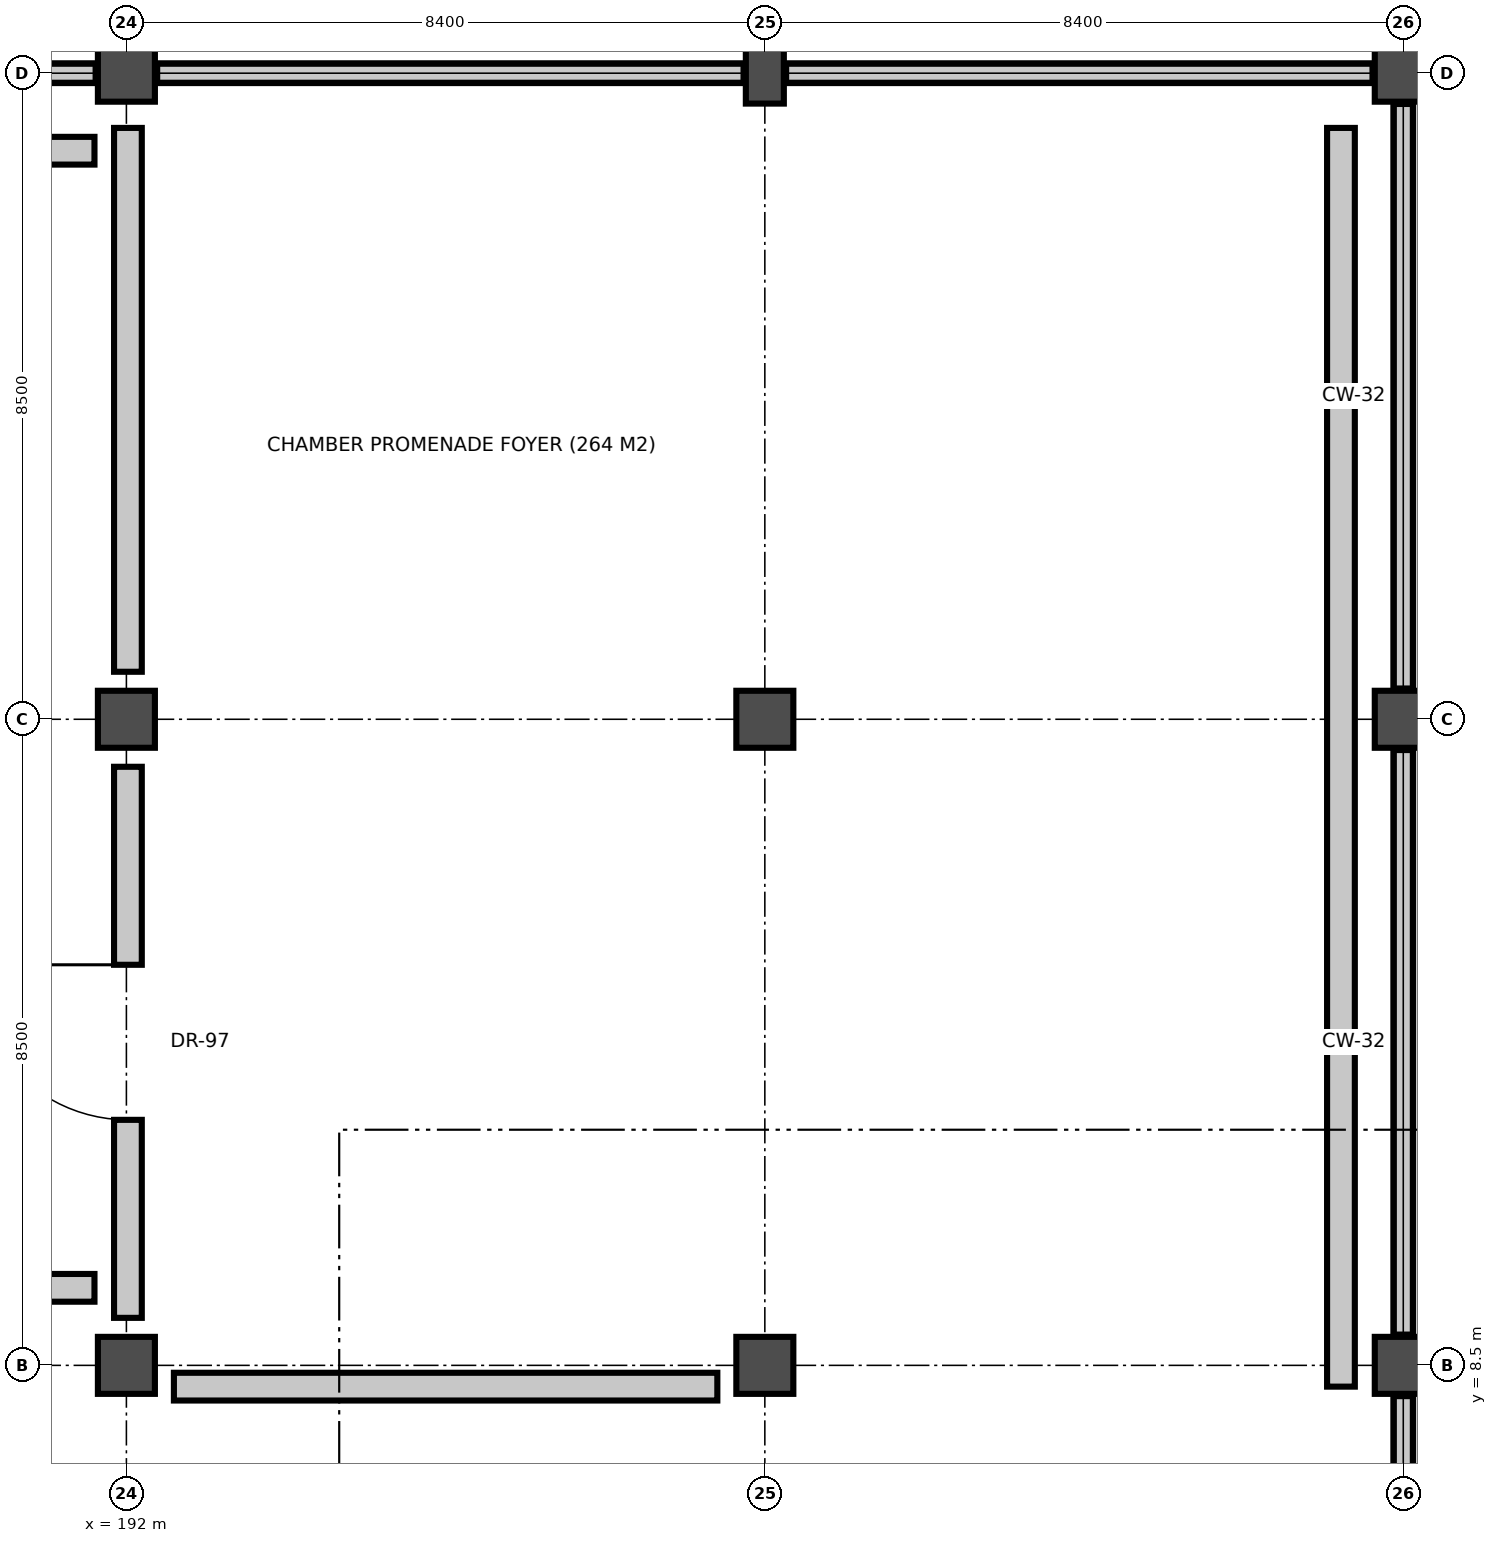
"""IFC4 building model, lengths in metres.
Left out: names, types, materials, properties, quantities, classifications, styles, units other than length and angle.
Written with IfcOpenShell. Run it as: python <this file> out.ifc"""

import sys

from ifc_helpers import new_model, si_unit, direction, frame, frame_2d, origin, origin_2d, place, context, subcontext, project, spatial, rectangle, extrude, element, fill, save


model = new_model("IFC4")
c1 = context("Model", 3, precision=1e-05, world=origin(), true_north=direction((0.0, 1.0)))
c2 = subcontext(c1, "Body", "Model", "MODEL_VIEW")
j1 = project(units=[si_unit("LENGTHUNIT", "METRE"), si_unit("PLANEANGLEUNIT", "RADIAN")], contexts=[c1])
p1 = place(None, origin())
s1 = spatial("IfcSite", under=j1, at=p1, CompositionType="ELEMENT")
p2 = place(p1, origin())
s2 = spatial("IfcBuilding", under=s1, at=p2, CompositionType="ELEMENT")
p3 = place(p2, frame((0.0, 0.0, 5.4)))
s3 = spatial("IfcBuildingStorey", under=s2, at=p3, CompositionType="ELEMENT", Elevation=5.4)
for number, where, z_axis, x_axis in (
    (1, (192.0, 8.5, 0.0), (0.0, 0.0, 1.0), (1.0, 0.0, 0.0)),
    (2, (192.0, 17.0, 0.0), (0.0, 0.0, 1.0), (1.0, 0.0, 0.0)),
    (3, (192.0, 25.5, 0.0), (0.0, 0.0, 1.0), (1.0, 0.0, 0.0)),
    (4, (200.4, 8.5, 0.0), (0.0, 0.0, 1.0), (1.0, 0.0, 0.0)),
    (5, (200.4, 17.0, 0.0), (0.0, 0.0, 1.0), (1.0, 0.0, 0.0)),
):
    element("IfcColumn", number, at=place(p3, frame(where, z_axis=z_axis, x_axis=x_axis)), inside=s3, PredefinedType="COLUMN", context=c2, shape_type="SweptSolid", body=[
        extrude(rectangle(XDim=0.75, YDim=0.75, at=origin_2d()), origin(), (0.0, 0.0, 1.0), 4.8),
    ])
p4 = place(p3, frame((200.4, 25.5, 0.0), z_axis=(0.0, 0.0, 1.0), x_axis=(1.0, 0.0, 0.0)))
e6 = element("IfcColumn", 6, at=p4, inside=s3, PredefinedType="PILASTER", context=c2, shape_type="SweptSolid", body=[
    extrude(rectangle(XDim=0.5, YDim=0.8, at=origin_2d()), origin(), (0.0, 0.0, 1.0), 4.8),
])
for number, where, z_axis, x_axis in (
    (7, (208.8, 8.5, 0.0), (0.0, 0.0, 1.0), (1.0, 0.0, 0.0)),
    (8, (208.8, 17.0, 0.0), (0.0, 0.0, 1.0), (1.0, 0.0, 0.0)),
    (9, (208.8, 25.5, 0.0), (0.0, 0.0, 1.0), (1.0, 0.0, 0.0)),
):
    element("IfcColumn", number, at=place(p3, frame(where, z_axis=z_axis, x_axis=x_axis)), inside=s3, PredefinedType="COLUMN", context=c2, shape_type="SweptSolid", body=[
        extrude(rectangle(XDim=0.75, YDim=0.75, at=origin_2d()), origin(), (0.0, 0.0, 1.0), 4.8),
    ])
p5 = place(p3, frame((183.995, 25.5, 0.0), z_axis=(0.0, 0.0, 1.0), x_axis=(1.0, 0.0, 0.0)))
e10 = element("IfcWall", 10, at=p5, inside=s3, PredefinedType="PARAPET", context=c2, shape_type="SweptSolid", body=[
    extrude(rectangle(XDim=7.61, YDim=0.26, at=frame_2d((3.805, 0.0))), origin(), (0.0, 0.0, 1.0), 1.12),
])
p6 = place(p3, frame((192.395, 25.5, 0.0), z_axis=(0.0, 0.0, 1.0), x_axis=(1.0, 0.0, 0.0)))
e11 = element("IfcWall", 11, at=p6, inside=s3, PredefinedType="PARAPET", context=c2, shape_type="SweptSolid", body=[
    extrude(rectangle(XDim=7.735, YDim=0.26, at=frame_2d((3.867, 0.0))), origin(), (0.0, 0.0, 1.0), 1.12),
])
p7 = place(p3, frame((200.67, 25.5, 0.0), z_axis=(0.0, 0.0, 1.0), x_axis=(1.0, 0.0, 0.0)))
e12 = element("IfcWall", 12, at=p7, inside=s3, PredefinedType="PARAPET", context=c2, shape_type="SweptSolid", body=[
    extrude(rectangle(XDim=7.735, YDim=0.26, at=frame_2d((3.868, 0.0))), origin(), (0.0, 0.0, 1.0), 1.12),
])
for number, where, z_axis, x_axis in (
    (13, (208.8, 8.105, 0.0), (0.0, 0.0, 1.0), (0.0, -1.0, 0.0)),
    (14, (208.8, 16.605, 0.0), (0.0, 0.0, 1.0), (0.0, -1.0, 0.0)),
    (15, (208.8, 25.105, 0.0), (0.0, 0.0, 1.0), (0.0, -1.0, 0.0)),
):
    element("IfcWall", number, at=place(p3, frame(where, z_axis=z_axis, x_axis=x_axis)), inside=s3, PredefinedType="PARAPET", context=c2, shape_type="SweptSolid", body=[
        extrude(rectangle(XDim=7.71, YDim=0.26, at=frame_2d((3.855, 0.0))), origin(), (0.0, 0.0, 1.0), 1.12),
    ])
p8 = place(p3, frame((164.02, 24.48, 0.0), z_axis=(0.0, 0.0, 1.0), x_axis=(1.0, 0.0, 0.0)))
e16 = element("IfcWall", 16, at=p8, inside=s3, PredefinedType="PARTITIONING", context=c2, shape_type="SweptSolid", body=[
    extrude(rectangle(XDim=27.56, YDim=0.365, at=frame_2d((13.78, 0.0))), origin(), (0.0, 0.0, 1.0), 3.45),
])
p9 = place(p3, frame((191.58, 9.52, 0.0), z_axis=(0.0, 0.0, 1.0), x_axis=(-1.0, 0.0, 0.0)))
e17 = element("IfcWall", 17, at=p9, inside=s3, PredefinedType="PARTITIONING", context=c2, shape_type="SweptSolid", body=[
    extrude(rectangle(XDim=26.587, YDim=0.365, at=frame_2d((13.293, 0.0))), origin(), (0.0, 0.0, 1.0), 3.424),
])
p10 = place(p9, frame((12.273, 0.0, 0.0)))
e18 = element("IfcOpeningElement", 18, at=p10, cuts=e17, PredefinedType="OPENING", context=c2, shape_type="SweptSolid", body=[
    extrude(rectangle(XDim=2.04, YDim=2.4, at=frame_2d((1.02, 1.2))), frame((0.0, 0.192, 0.0), z_axis=(0.0, -1.0, 0.0), x_axis=(1.0, 0.0, 0.0)), (0.0, 0.0, 1.0), 0.385),
])
p11 = place(p3, frame((207.98, 24.78, 0.0), z_axis=(0.0, 0.0, 1.0), x_axis=(0.0, -1.0, 0.0)))
e19 = element("IfcWall", 19, at=p11, inside=s3, PredefinedType="PARTITIONING", context=c2, shape_type="SweptSolid", body=[
    extrude(rectangle(XDim=16.56, YDim=0.365, at=frame_2d((8.28, 0.0))), origin(), (0.0, 0.0, 1.0), 3.318),
])
p12 = place(p3, frame((192.02, 9.125, 0.0), z_axis=(0.0, 0.0, 1.0), x_axis=(0.0, 1.0, 0.0)))
e20 = element("IfcWall", 20, at=p12, inside=s3, PredefinedType="PARTITIONING", context=c2, shape_type="SweptSolid", body=[
    extrude(rectangle(XDim=7.25, YDim=0.365, at=frame_2d((3.625, 0.0))), origin(), (0.0, 0.0, 1.0), 3.424),
])
p13 = place(p12, frame((2.605, 0.0, 0.0)))
e21 = element("IfcOpeningElement", 21, at=p13, cuts=e20, PredefinedType="OPENING", context=c2, shape_type="SweptSolid", body=[
    extrude(rectangle(XDim=2.04, YDim=2.4, at=frame_2d((1.02, 1.2))), frame((0.0, 0.192, 0.0), z_axis=(0.0, -1.0, 0.0), x_axis=(1.0, 0.0, 0.0)), (0.0, 0.0, 1.0), 0.385),
])
p14 = place(p3, frame((192.02, 17.625, 0.0), z_axis=(0.0, 0.0, 1.0), x_axis=(0.0, 1.0, 0.0)))
e22 = element("IfcWall", 22, at=p14, inside=s3, PredefinedType="PARTITIONING", context=c2, shape_type="SweptSolid", body=[
    extrude(rectangle(XDim=7.155, YDim=0.365, at=frame_2d((3.578, 0.0))), origin(), (0.0, 0.0, 1.0), 3.45),
])
p15 = place(p3, frame((199.775, 8.22, 0.0), z_axis=(0.0, 0.0, 1.0), x_axis=(-1.0, 0.0, 0.0)))
e23 = element("IfcWall", 23, at=p15, inside=s3, PredefinedType="PARTITIONING", context=c2, shape_type="SweptSolid", body=[
    extrude(rectangle(XDim=7.15, YDim=0.365, at=frame_2d((3.575, 0.0))), origin(), (0.0, 0.0, 1.0), 3.45),
])
p16 = place(p13, origin())
e24 = element("IfcDoor", 24, at=p16, inside=s3, OperationType="SINGLE_SWING_RIGHT", PredefinedType="DOOR", context=c2, shape_type="SweptSolid", body=[
    extrude(rectangle(XDim=2.04, YDim=2.4, at=frame_2d((1.02, 1.2))), frame((0.0, 0.025, 0.0), z_axis=(0.0, -1.0, 0.0), x_axis=(1.0, 0.0, 0.0)), (0.0, 0.0, 1.0), 0.05),
])
fill(e21, e24)
save(model, sys.argv[1])
